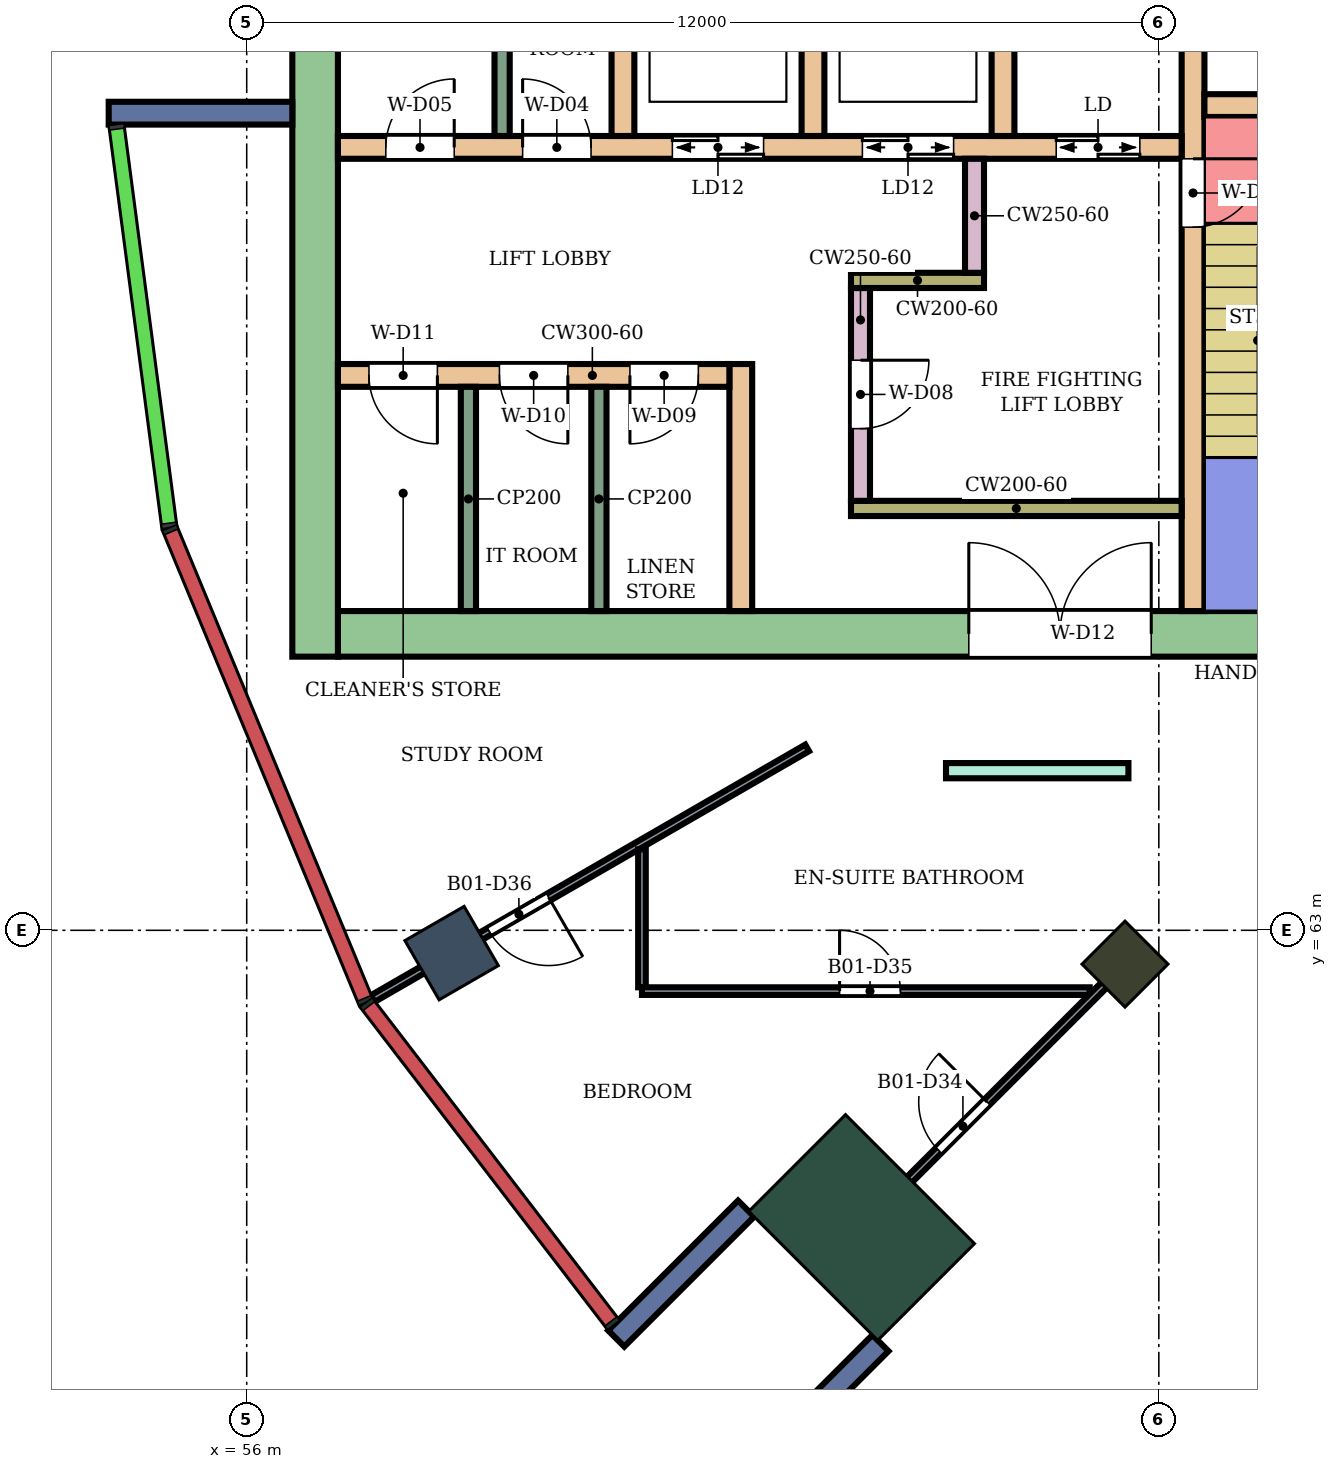
"""IFC4 building model, lengths in metres.
Left out: names, types, materials, properties, quantities, classifications, styles, units other than length and angle.
Written with IfcOpenShell. Run it as: python <this file> out.ifc"""

import sys

from ifc_helpers import new_model, si_unit, direction, frame, frame_2d, origin, origin_2d, place, context, subcontext, project, spatial, rectangle, extrude, element, fill, save


model = new_model("IFC4")
c1 = context("Model", 3, precision=1e-05, world=origin(), true_north=direction((0.0, 1.0)))
c2 = subcontext(c1, "Body", "Model", "MODEL_VIEW")
j1 = project(units=[si_unit("LENGTHUNIT", "METRE"), si_unit("PLANEANGLEUNIT", "RADIAN")], contexts=[c1])
p1 = place(None, origin())
s1 = spatial("IfcSite", under=j1, at=p1, CompositionType="ELEMENT")
p2 = place(p1, origin())
s2 = spatial("IfcBuilding", under=s1, at=p2, CompositionType="ELEMENT")
p3 = place(p2, frame((0.0, 0.0, 212.5)))
s3 = spatial("IfcBuildingStorey", under=s2, at=p3, CompositionType="ELEMENT", Elevation=212.5)
p4 = place(p3, frame((58.696, 62.7, 0.0), z_axis=(0.0, 0.0, 1.0), x_axis=(-0.866025403784, -0.5, 0.0)))
e1 = element("IfcColumn", 1, at=p4, inside=s3, PredefinedType="COLUMN", context=c2, shape_type="SweptSolid", body=[
    extrude(rectangle(XDim=0.9, YDim=0.9, at=origin_2d()), origin(), (0.0, 0.0, 1.0), 4.2),
])
p5 = place(p3, frame((67.555, 62.555, 0.0), z_axis=(0.0, 0.0, 1.0), x_axis=(-0.707106781187, -0.707106781187, 0.0)))
e2 = element("IfcColumn", 2, at=p5, inside=s3, PredefinedType="COLUMN", context=c2, shape_type="SweptSolid", body=[
    extrude(rectangle(XDim=0.8, YDim=0.8, at=origin_2d()), origin(), (0.0, 0.0, 1.0), 4.2),
])
p6 = place(p3, frame((64.09, 59.09, 0.0), z_axis=(0.0, 0.0, 1.0), x_axis=(-0.707106781187, -0.707106781187, 0.0)))
e3 = element("IfcColumn", 3, at=p6, inside=s3, PredefinedType="COLUMN", context=c2, shape_type="SweptSolid", body=[
    extrude(rectangle(XDim=1.8, YDim=2.4, at=origin_2d()), origin(), (0.0, 0.0, 1.0), 4.2),
])
p7 = place(p3, frame((72.1, 66.9, 0.0), z_axis=(0.0, 0.0, 1.0), x_axis=(-1.0, 0.0, 0.0)))
e4 = element("IfcWall", 4, at=p7, inside=s3, PredefinedType="SHEAR", context=c2, shape_type="SweptSolid", body=[
    extrude(rectangle(XDim=14.9, YDim=0.6, at=frame_2d((7.45, 0.0))), origin(), (0.0, 0.0, 1.0), 3.88),
])
p8 = place(p7, frame((4.2, 0.0, 0.0)))
e5 = element("IfcOpeningElement", 5, at=p8, cuts=e4, PredefinedType="OPENING", context=c2, shape_type="SweptSolid", body=[
    extrude(rectangle(XDim=2.4, YDim=2.4, at=frame_2d((1.2, 1.2))), frame((0.0, 0.31, 0.0), z_axis=(0.0, -1.0, 0.0), x_axis=(1.0, 0.0, 0.0)), (0.0, 0.0, 1.0), 0.62),
])
p9 = place(p3, frame((56.9, 83.4, 0.0), z_axis=(0.0, 0.0, 1.0), x_axis=(0.0, -1.0, 0.0)))
e6 = element("IfcWall", 6, at=p9, inside=s3, PredefinedType="SHEAR", context=c2, shape_type="SweptSolid", body=[
    extrude(rectangle(XDim=16.8, YDim=0.6, at=frame_2d((8.4, 0.0))), origin(), (0.0, 0.0, 1.0), 3.88),
])
p10 = place(p3, frame((68.45, 75.0, 0.0), z_axis=(0.0, 0.0, 1.0), x_axis=(0.0, -1.0, 0.0)))
e7 = element("IfcWall", 7, at=p10, inside=s3, PredefinedType="SHEAR", context=c2, shape_type="SweptSolid", body=[
    extrude(rectangle(XDim=7.8, YDim=0.3, at=frame_2d((3.9, 0.0))), origin(), (0.0, 0.0, 1.0), 3.88),
])
p11 = place(p10, frame((1.85, 0.0, 0.0)))
e8 = element("IfcOpeningElement", 8, at=p11, cuts=e7, PredefinedType="OPENING", context=c2, shape_type="SweptSolid", body=[
    extrude(rectangle(XDim=0.9, YDim=2.1, at=frame_2d((0.45, 1.05))), frame((0.0, 0.16, 0.0), z_axis=(0.0, -1.0, 0.0), x_axis=(1.0, 0.0, 0.0)), (0.0, 0.0, 1.0), 0.32),
])
p12 = place(p3, frame((71.65, 73.85, 0.0), z_axis=(0.0, 0.0, 1.0), x_axis=(-1.0, 0.0, 0.0)))
e9 = element("IfcWall", 9, at=p12, inside=s3, PredefinedType="SHEAR", context=c2, shape_type="SweptSolid", body=[
    extrude(rectangle(XDim=3.05, YDim=0.3, at=frame_2d((1.525, 0.0))), origin(), (0.0, 0.0, 1.0), 3.88),
])
p13 = place(p12, frame((1.1, 0.0, 0.0)))
e10 = element("IfcOpeningElement", 10, at=p13, cuts=e9, PredefinedType="OPENING", context=c2, shape_type="SweptSolid", body=[
    extrude(rectangle(XDim=0.7, YDim=2.0, at=frame_2d((0.35, 1.0))), frame((0.0, 0.16, 0.0), z_axis=(0.0, -1.0, 0.0), x_axis=(1.0, 0.0, 0.0)), (0.0, 0.0, 1.0), 0.32),
])
p14 = place(p3, frame((68.3, 73.3, 0.0), z_axis=(0.0, 0.0, 1.0), x_axis=(-1.0, 0.0, 0.0)))
e11 = element("IfcWall", 11, at=p14, inside=s3, PredefinedType="SHEAR", context=c2, shape_type="SweptSolid", body=[
    extrude(rectangle(XDim=11.1, YDim=0.3, at=frame_2d((5.55, 0.0))), origin(), (0.0, 0.0, 1.0), 3.88),
])
p15 = place(p14, frame((0.55, 0.0, 0.0)))
e12 = element("IfcOpeningElement", 12, at=p15, cuts=e11, PredefinedType="OPENING", context=c2, shape_type="SweptSolid", body=[
    extrude(rectangle(XDim=1.1, YDim=2.1, at=frame_2d((0.55, 1.05))), frame((0.0, 0.16, 0.0), z_axis=(0.0, -1.0, 0.0), x_axis=(1.0, 0.0, 0.0)), (0.0, 0.0, 1.0), 0.32),
])
p16 = place(p14, frame((3.0, 0.0, 0.0)))
e13 = element("IfcOpeningElement", 13, at=p16, cuts=e11, PredefinedType="OPENING", context=c2, shape_type="SweptSolid", body=[
    extrude(rectangle(XDim=1.2, YDim=2.1, at=frame_2d((0.6, 1.05))), frame((0.0, 0.16, 0.0), z_axis=(0.0, -1.0, 0.0), x_axis=(1.0, 0.0, 0.0)), (0.0, 0.0, 1.0), 0.32),
])
p17 = place(p14, frame((5.5, 0.0, 0.0)))
e14 = element("IfcOpeningElement", 14, at=p17, cuts=e11, PredefinedType="OPENING", context=c2, shape_type="SweptSolid", body=[
    extrude(rectangle(XDim=1.2, YDim=2.1, at=frame_2d((0.6, 1.05))), frame((0.0, 0.16, 0.0), z_axis=(0.0, -1.0, 0.0), x_axis=(1.0, 0.0, 0.0)), (0.0, 0.0, 1.0), 0.32),
])
p18 = place(p14, frame((7.77, 0.0, 0.0)))
e15 = element("IfcOpeningElement", 15, at=p18, cuts=e11, PredefinedType="OPENING", context=c2, shape_type="SweptSolid", body=[
    extrude(rectangle(XDim=0.9, YDim=2.1, at=frame_2d((0.45, 1.05))), frame((0.0, 0.16, 0.0), z_axis=(0.0, -1.0, 0.0), x_axis=(1.0, 0.0, 0.0)), (0.0, 0.0, 1.0), 0.32),
])
p19 = place(p14, frame((9.57, 0.0, 0.0)))
e16 = element("IfcOpeningElement", 16, at=p19, cuts=e11, PredefinedType="OPENING", context=c2, shape_type="SweptSolid", body=[
    extrude(rectangle(XDim=0.9, YDim=2.1, at=frame_2d((0.45, 1.05))), frame((0.0, 0.16, 0.0), z_axis=(0.0, -1.0, 0.0), x_axis=(1.0, 0.0, 0.0)), (0.0, 0.0, 1.0), 0.32),
])
for number, where, z_axis, x_axis in (
    (17, (65.95, 76.0, 0.0), (0.0, 0.0, 1.0), (0.0, -1.0, 0.0)),
    (18, (63.45, 76.0, 0.0), (0.0, 0.0, 1.0), (0.0, -1.0, 0.0)),
    (19, (60.95, 76.0, 0.0), (0.0, 0.0, 1.0), (0.0, -1.0, 0.0)),
):
    element("IfcWall", number, at=place(p3, frame(where, z_axis=z_axis, x_axis=x_axis)), inside=s3, PredefinedType="SHEAR", context=c2, shape_type="SweptSolid", body=[
        extrude(rectangle(XDim=2.55, YDim=0.3, at=frame_2d((1.275, 0.0))), origin(), (0.0, 0.0, 1.0), 3.88),
    ])
p20 = place(p3, frame((68.3, 68.55, 0.0), z_axis=(0.0, 0.0, 1.0), x_axis=(-1.0, 0.0, 0.0)))
e20 = element("IfcWall", 20, at=p20, inside=s3, PredefinedType="SHEAR", context=c2, shape_type="SweptSolid", body=[
    extrude(rectangle(XDim=4.35, YDim=0.2, at=frame_2d((2.175, 0.0))), origin(), (0.0, 0.0, 1.0), 3.88),
])
p21 = place(p3, frame((64.075, 71.45, 0.0), z_axis=(0.0, 0.0, 1.0), x_axis=(0.0, -1.0, 0.0)))
e21 = element("IfcWall", 21, at=p21, inside=s3, PredefinedType="SHEAR", context=c2, shape_type="SweptSolid", body=[
    extrude(rectangle(XDim=2.8, YDim=0.25, at=frame_2d((1.4, 0.0))), origin(), (0.0, 0.0, 1.0), 3.88),
])
p22 = place(p21, frame((0.95, 0.0, 0.0)))
e22 = element("IfcOpeningElement", 22, at=p22, cuts=e21, PredefinedType="OPENING", context=c2, shape_type="SweptSolid", body=[
    extrude(rectangle(XDim=0.9, YDim=2.1, at=frame_2d((0.45, 1.05))), frame((0.0, 0.135, 0.0), z_axis=(0.0, -1.0, 0.0), x_axis=(1.0, 0.0, 0.0)), (0.0, 0.0, 1.0), 0.27),
])
p23 = place(p3, frame((65.7, 71.55, 0.0), z_axis=(0.0, 0.0, 1.0), x_axis=(-1.0, 0.0, 0.0)))
e23 = element("IfcWall", 23, at=p23, inside=s3, PredefinedType="SHEAR", context=c2, shape_type="SweptSolid", body=[
    extrude(rectangle(XDim=1.75, YDim=0.2, at=frame_2d((0.875, 0.0))), origin(), (0.0, 0.0, 1.0), 3.88),
])
p24 = place(p3, frame((65.575, 73.15, 0.0), z_axis=(0.0, 0.0, 1.0), x_axis=(0.0, -1.0, 0.0)))
e24 = element("IfcWall", 24, at=p24, inside=s3, PredefinedType="SHEAR", context=c2, shape_type="SweptSolid", body=[
    extrude(rectangle(XDim=1.5, YDim=0.25, at=frame_2d((0.75, 0.0))), origin(), (0.0, 0.0, 1.0), 3.88),
])
p25 = place(p3, frame((62.5, 70.45, 0.0), z_axis=(0.0, 0.0, 1.0), x_axis=(0.0, -1.0, 0.0)))
e25 = element("IfcWall", 25, at=p25, inside=s3, PredefinedType="SHEAR", context=c2, shape_type="SweptSolid", body=[
    extrude(rectangle(XDim=3.25, YDim=0.3, at=frame_2d((1.625, 0.0))), origin(), (0.0, 0.0, 1.0), 3.88),
])
p26 = place(p3, frame((62.35, 70.3, 0.0), z_axis=(0.0, 0.0, 1.0), x_axis=(-1.0, 0.0, 0.0)))
e26 = element("IfcWall", 26, at=p26, inside=s3, PredefinedType="SHEAR", context=c2, shape_type="SweptSolid", body=[
    extrude(rectangle(XDim=5.15, YDim=0.3, at=frame_2d((2.575, 0.0))), origin(), (0.0, 0.0, 1.0), 3.88),
])
p27 = place(p26, frame((0.408, 0.0, 0.0)))
e27 = element("IfcOpeningElement", 27, at=p27, cuts=e26, PredefinedType="OPENING", context=c2, shape_type="SweptSolid", body=[
    extrude(rectangle(XDim=0.9, YDim=2.1, at=frame_2d((0.45, 1.05))), frame((0.0, 0.16, 0.0), z_axis=(0.0, -1.0, 0.0), x_axis=(1.0, 0.0, 0.0)), (0.0, 0.0, 1.0), 0.32),
])
p28 = place(p26, frame((2.125, 0.0, 0.0)))
e28 = element("IfcOpeningElement", 28, at=p28, cuts=e26, PredefinedType="OPENING", context=c2, shape_type="SweptSolid", body=[
    extrude(rectangle(XDim=0.9, YDim=2.1, at=frame_2d((0.45, 1.05))), frame((0.0, 0.16, 0.0), z_axis=(0.0, -1.0, 0.0), x_axis=(1.0, 0.0, 0.0)), (0.0, 0.0, 1.0), 0.32),
])
p29 = place(p26, frame((3.842, 0.0, 0.0)))
e29 = element("IfcOpeningElement", 29, at=p29, cuts=e26, PredefinedType="OPENING", context=c2, shape_type="SweptSolid", body=[
    extrude(rectangle(XDim=0.9, YDim=2.1, at=frame_2d((0.45, 1.05))), frame((0.0, 0.16, 0.0), z_axis=(0.0, -1.0, 0.0), x_axis=(1.0, 0.0, 0.0)), (0.0, 0.0, 1.0), 0.32),
])
for number, where, z_axis, x_axis in (
    (30, (56.6, 73.75, 0.0), (0.0, 0.0, 1.0), (-1.0, 0.0, 0.0)),
    (31, (62.57, 59.338, 0.0), (0.0, 0.0, 1.0), (-0.707, -0.707, 0.0)),
    (32, (64.338, 57.57, 0.0), (0.0, 0.0, 1.0), (-0.707, -0.707, 0.0)),
):
    element("IfcWall", number, at=place(p3, frame(where, z_axis=z_axis, x_axis=x_axis)), inside=s3, PredefinedType="NOTDEFINED", context=c2, shape_type="SweptSolid", body=[
        extrude(rectangle(XDim=2.416, YDim=0.3, at=frame_2d((1.208, 0.0))), origin(), (0.0, 0.0, 1.0), 4.2),
    ])
p30 = place(p3, frame((65.2, 65.1, 0.0), z_axis=(0.0, 0.0, 1.0), x_axis=(1.0, 0.0, 0.0)))
e33 = element("IfcWall", 33, at=p30, inside=s3, PredefinedType="PARTITIONING", context=c2, shape_type="SweptSolid", body=[
    extrude(rectangle(XDim=2.4, YDim=0.2, at=frame_2d((1.2, 0.0))), origin(), (0.0, 0.0, 1.0), 3.75),
])
p31 = place(p3, frame((67.099, 52.66, 0.0), z_axis=(0.0, 0.0, 1.0), x_axis=(0.500120472712, 0.865955837658, 0.0)))
e34 = element("IfcWall", 34, at=p31, inside=s3, PredefinedType="PARTITIONING", context=c2, shape_type="SweptSolid", body=[
    extrude(rectangle(XDim=12.866, YDim=0.2, at=frame_2d((6.433, 0.0))), origin(), (0.0, 0.0, 1.0), 3.75),
])
p32 = place(p3, frame((57.658, 62.102, 0.0), z_axis=(0.0, 0.0, 1.0), x_axis=(0.866131372301, 0.499816412211, 0.0)))
e35 = element("IfcWall", 35, at=p32, inside=s3, PredefinedType="PARTITIONING", context=c2, shape_type="SweptSolid", body=[
    extrude(rectangle(XDim=6.598, YDim=0.1, at=frame_2d((3.299, 0.0))), origin(), (0.0, 0.0, 1.0), 3.75),
])
p33 = place(p32, frame((1.77, 0.0, 0.0)))
e36 = element("IfcOpeningElement", 36, at=p33, cuts=e35, PredefinedType="OPENING", context=c2, shape_type="SweptSolid", body=[
    extrude(rectangle(XDim=0.9, YDim=2.1, at=frame_2d((0.45, 1.05))), frame((0.0, 0.06, 0.0), z_axis=(0.0, -1.0, 0.0), x_axis=(1.0, 0.0, 0.0)), (0.0, 0.0, 1.0), 0.12),
])
p34 = place(p3, frame((61.2, 62.25, 0.0), z_axis=(0.0, 0.0, 1.0), x_axis=(0.0, 1.0, 0.0)))
e37 = element("IfcWall", 37, at=p34, inside=s3, PredefinedType="PARTITIONING", context=c2, shape_type="SweptSolid", body=[
    extrude(rectangle(XDim=1.816, YDim=0.1, at=frame_2d((0.908, 0.0))), origin(), (0.0, 0.0, 1.0), 3.75),
])
p35 = place(p3, frame((61.2, 62.2, 0.0), z_axis=(0.0, 0.0, 1.0), x_axis=(1.0, 0.0, 0.0)))
e38 = element("IfcWall", 38, at=p35, inside=s3, PredefinedType="PARTITIONING", context=c2, shape_type="SweptSolid", body=[
    extrude(rectangle(XDim=5.89, YDim=0.1, at=frame_2d((2.945, 0.0))), origin(), (0.0, 0.0, 1.0), 3.75),
])
p36 = place(p35, frame((2.6, 0.0, 0.0)))
e39 = element("IfcOpeningElement", 39, at=p36, cuts=e38, PredefinedType="OPENING", context=c2, shape_type="SweptSolid", body=[
    extrude(rectangle(XDim=0.8, YDim=2.1, at=frame_2d((0.4, 1.05))), frame((0.0, 0.06, 0.0), z_axis=(0.0, -1.0, 0.0), x_axis=(1.0, 0.0, 0.0)), (0.0, 0.0, 1.0), 0.12),
])
p37 = place(p3, frame((63.596, 58.596, 0.0), z_axis=(0.0, 0.0, 1.0), x_axis=(0.707106781187, 0.707106781187, 0.0)))
e40 = element("IfcWall", 40, at=p37, inside=s3, PredefinedType="PARTITIONING", context=c2, shape_type="SweptSolid", body=[
    extrude(rectangle(XDim=5.663, YDim=0.1, at=frame_2d((2.832, 0.0))), origin(), (0.0, 0.0, 1.0), 3.75),
])
p38 = place(p37, frame((2.134, 0.0, 0.0)))
e41 = element("IfcOpeningElement", 41, at=p38, cuts=e40, PredefinedType="OPENING", context=c2, shape_type="SweptSolid", body=[
    extrude(rectangle(XDim=0.9, YDim=2.1, at=frame_2d((0.45, 1.05))), frame((0.0, 0.06, 0.0), z_axis=(0.0, -1.0, 0.0), x_axis=(1.0, 0.0, 0.0)), (0.0, 0.0, 1.0), 0.12),
])
p39 = place(p3, frame((59.36, 76.0, 0.0), z_axis=(0.0, 0.0, 1.0), x_axis=(0.0, -1.0, 0.0)))
e42 = element("IfcWall", 42, at=p39, inside=s3, PredefinedType="PARTITIONING", context=c2, shape_type="SweptSolid", body=[
    extrude(rectangle(XDim=2.55, YDim=0.2, at=frame_2d((1.275, 0.0))), origin(), (0.0, 0.0, 1.0), 3.88),
])
for number, where, z_axis, x_axis in (
    (43, (60.633, 70.15, 0.0), (0.0, 0.0, 1.0), (0.0, -1.0, 0.0)),
    (44, (58.917, 70.15, 0.0), (0.0, 0.0, 1.0), (0.0, -1.0, 0.0)),
):
    element("IfcWall", number, at=place(p3, frame(where, z_axis=z_axis, x_axis=x_axis)), inside=s3, PredefinedType="PARTITIONING", context=c2, shape_type="SweptSolid", body=[
        extrude(rectangle(XDim=2.95, YDim=0.2, at=frame_2d((1.475, 0.0))), origin(), (0.0, 0.0, 1.0), 3.88),
    ])
p40 = place(p38, origin())
e45 = element("IfcDoor", 45, at=p40, inside=s3, OperationType="SINGLE_SWING_RIGHT", PredefinedType="DOOR", context=c2, shape_type="SweptSolid", body=[
    extrude(rectangle(XDim=0.9, YDim=2.1, at=frame_2d((0.45, 1.05))), frame((0.0, 0.025, 0.0), z_axis=(0.0, -1.0, 0.0), x_axis=(1.0, 0.0, 0.0)), (0.0, 0.0, 1.0), 0.05),
])
fill(e41, e45)
p41 = place(p36, origin())
e46 = element("IfcDoor", 46, at=p41, inside=s3, OperationType="SINGLE_SWING_LEFT", PredefinedType="DOOR", context=c2, shape_type="SweptSolid", body=[
    extrude(rectangle(XDim=0.8, YDim=2.1, at=frame_2d((0.4, 1.05))), frame((0.0, 0.025, 0.0), z_axis=(0.0, -1.0, 0.0), x_axis=(1.0, 0.0, 0.0)), (0.0, 0.0, 1.0), 0.05),
])
fill(e39, e46)
p42 = place(p33, frame((0.9, 0.0, 0.0), z_axis=(0.0, 0.0, 1.0), x_axis=(-1.0, 0.0, 0.0)))
e47 = element("IfcDoor", 47, at=p42, inside=s3, OperationType="SINGLE_SWING_LEFT", PredefinedType="DOOR", context=c2, shape_type="SweptSolid", body=[
    extrude(rectangle(XDim=0.9, YDim=2.1, at=frame_2d((0.45, 1.05))), frame((0.0, 0.025, 0.0), z_axis=(0.0, -1.0, 0.0), x_axis=(1.0, 0.0, 0.0)), (0.0, 0.0, 1.0), 0.05),
])
fill(e36, e47)
p43 = place(p11, origin())
e48 = element("IfcDoor", 48, at=p43, inside=s3, OperationType="SINGLE_SWING_LEFT", PredefinedType="DOOR", context=c2, shape_type="SweptSolid", body=[
    extrude(rectangle(XDim=0.9, YDim=2.1, at=frame_2d((0.45, 1.05))), frame((0.0, 0.025, 0.0), z_axis=(0.0, -1.0, 0.0), x_axis=(1.0, 0.0, 0.0)), (0.0, 0.0, 1.0), 0.05),
])
fill(e8, e48)
p44 = place(p15, origin())
e49 = element("IfcDoor", 49, at=p44, inside=s3, OperationType="DOUBLE_DOOR_SLIDING", PredefinedType="DOOR", context=c2, shape_type="SweptSolid", body=[
    extrude(rectangle(XDim=1.1, YDim=2.1, at=frame_2d((0.55, 1.05))), frame((0.0, 0.025, 0.0), z_axis=(0.0, -1.0, 0.0), x_axis=(1.0, 0.0, 0.0)), (0.0, 0.0, 1.0), 0.05),
])
fill(e12, e49)
p45 = place(p16, origin())
e50 = element("IfcDoor", 50, at=p45, inside=s3, OperationType="DOUBLE_DOOR_SLIDING", PredefinedType="DOOR", context=c2, shape_type="SweptSolid", body=[
    extrude(rectangle(XDim=1.2, YDim=2.1, at=frame_2d((0.6, 1.05))), frame((0.0, 0.025, 0.0), z_axis=(0.0, -1.0, 0.0), x_axis=(1.0, 0.0, 0.0)), (0.0, 0.0, 1.0), 0.05),
])
fill(e13, e50)
p46 = place(p17, origin())
e51 = element("IfcDoor", 51, at=p46, inside=s3, OperationType="DOUBLE_DOOR_SLIDING", PredefinedType="DOOR", context=c2, shape_type="SweptSolid", body=[
    extrude(rectangle(XDim=1.2, YDim=2.1, at=frame_2d((0.6, 1.05))), frame((0.0, 0.025, 0.0), z_axis=(0.0, -1.0, 0.0), x_axis=(1.0, 0.0, 0.0)), (0.0, 0.0, 1.0), 0.05),
])
fill(e14, e51)
p47 = place(p18, frame((0.9, 0.0, 0.0), z_axis=(0.0, 0.0, 1.0), x_axis=(-1.0, 0.0, 0.0)))
e52 = element("IfcDoor", 52, at=p47, inside=s3, OperationType="SINGLE_SWING_LEFT", PredefinedType="DOOR", context=c2, shape_type="SweptSolid", body=[
    extrude(rectangle(XDim=0.9, YDim=2.1, at=frame_2d((0.45, 1.05))), frame((0.0, 0.025, 0.0), z_axis=(0.0, -1.0, 0.0), x_axis=(1.0, 0.0, 0.0)), (0.0, 0.0, 1.0), 0.05),
])
fill(e15, e52)
p48 = place(p19, frame((0.9, 0.0, 0.0), z_axis=(0.0, 0.0, 1.0), x_axis=(-1.0, 0.0, 0.0)))
e53 = element("IfcDoor", 53, at=p48, inside=s3, OperationType="SINGLE_SWING_RIGHT", PredefinedType="DOOR", context=c2, shape_type="SweptSolid", body=[
    extrude(rectangle(XDim=0.9, YDim=2.1, at=frame_2d((0.45, 1.05))), frame((0.0, 0.025, 0.0), z_axis=(0.0, -1.0, 0.0), x_axis=(1.0, 0.0, 0.0)), (0.0, 0.0, 1.0), 0.05),
])
fill(e16, e53)
p49 = place(p22, origin())
e54 = element("IfcDoor", 54, at=p49, inside=s3, OperationType="SINGLE_SWING_LEFT", PredefinedType="DOOR", context=c2, shape_type="SweptSolid", body=[
    extrude(rectangle(XDim=0.9, YDim=2.1, at=frame_2d((0.45, 1.05))), frame((0.0, 0.025, 0.0), z_axis=(0.0, -1.0, 0.0), x_axis=(1.0, 0.0, 0.0)), (0.0, 0.0, 1.0), 0.05),
])
fill(e22, e54)
p50 = place(p27, origin())
e55 = element("IfcDoor", 55, at=p50, inside=s3, OperationType="SINGLE_SWING_RIGHT", PredefinedType="DOOR", context=c2, shape_type="SweptSolid", body=[
    extrude(rectangle(XDim=0.9, YDim=2.1, at=frame_2d((0.45, 1.05))), frame((0.0, 0.025, 0.0), z_axis=(0.0, -1.0, 0.0), x_axis=(1.0, 0.0, 0.0)), (0.0, 0.0, 1.0), 0.05),
])
fill(e27, e55)
p51 = place(p28, origin())
e56 = element("IfcDoor", 56, at=p51, inside=s3, OperationType="SINGLE_SWING_LEFT", PredefinedType="DOOR", context=c2, shape_type="SweptSolid", body=[
    extrude(rectangle(XDim=0.9, YDim=2.1, at=frame_2d((0.45, 1.05))), frame((0.0, 0.025, 0.0), z_axis=(0.0, -1.0, 0.0), x_axis=(1.0, 0.0, 0.0)), (0.0, 0.0, 1.0), 0.05),
])
fill(e28, e56)
p52 = place(p29, origin())
e57 = element("IfcDoor", 57, at=p52, inside=s3, OperationType="SINGLE_SWING_LEFT", PredefinedType="DOOR", context=c2, shape_type="SweptSolid", body=[
    extrude(rectangle(XDim=0.9, YDim=2.1, at=frame_2d((0.45, 1.05))), frame((0.0, 0.025, 0.0), z_axis=(0.0, -1.0, 0.0), x_axis=(1.0, 0.0, 0.0)), (0.0, 0.0, 1.0), 0.05),
])
fill(e29, e57)
p53 = place(p8, frame((2.4, 0.0, 0.0), z_axis=(0.0, 0.0, 1.0), x_axis=(-1.0, 0.0, 0.0)))
e58 = element("IfcDoor", 58, at=p53, inside=s3, OperationType="DOUBLE_DOOR_SINGLE_SWING", PredefinedType="DOOR", context=c2, shape_type="SweptSolid", body=[
    extrude(rectangle(XDim=2.4, YDim=2.4, at=frame_2d((1.2, 1.2))), frame((0.0, 0.025, 0.0), z_axis=(0.0, -1.0, 0.0), x_axis=(1.0, 0.0, 0.0)), (0.0, 0.0, 1.0), 0.05),
])
fill(e5, e58)
save(model, sys.argv[1])
